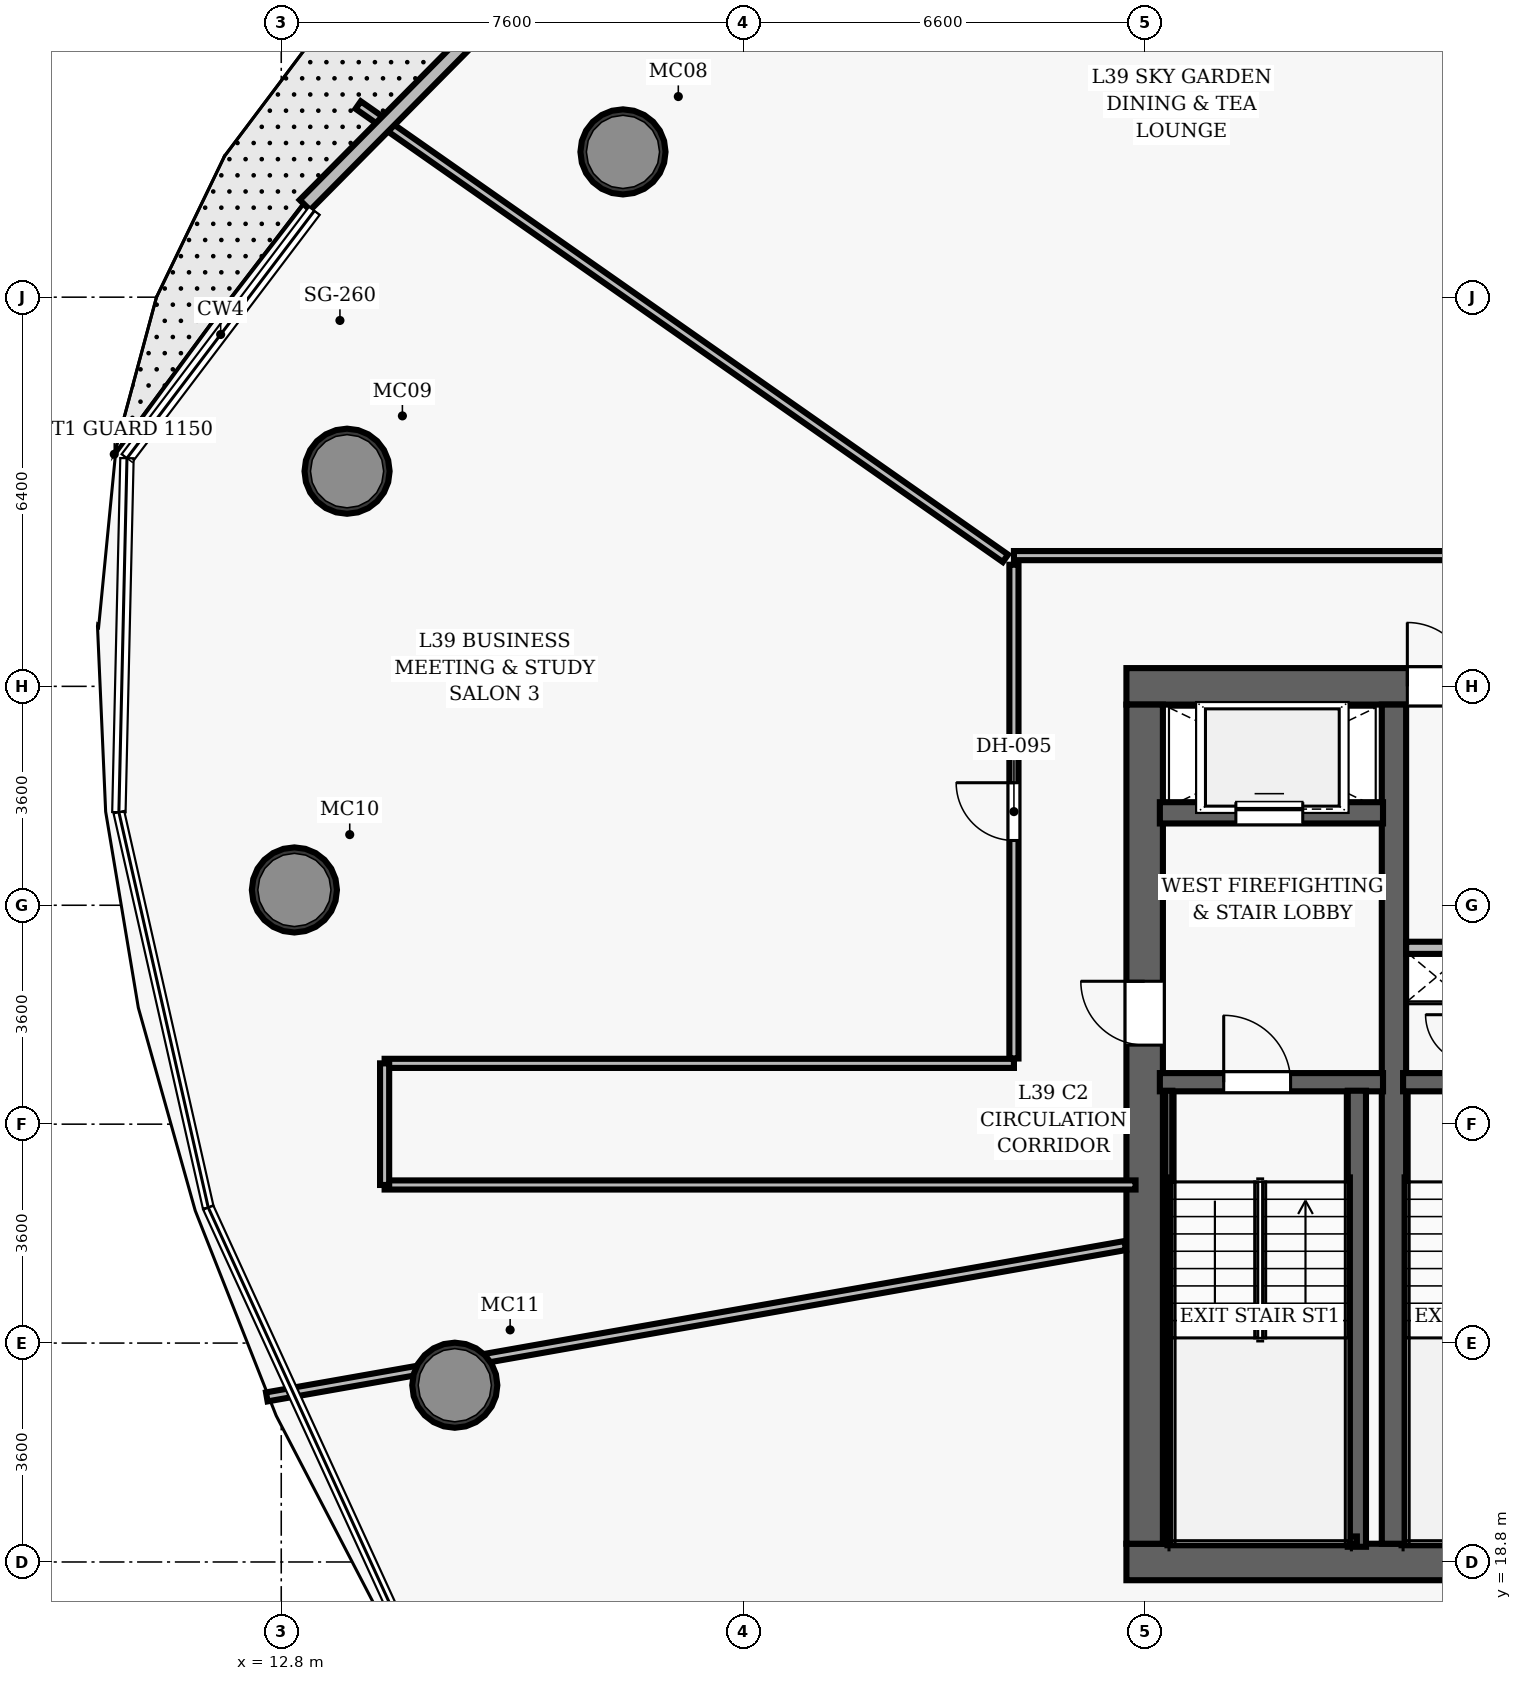
"""IFC4 building model, lengths in metres.
Left out: names, types, materials, properties, quantities, classifications, styles, units other than length and angle.
Written with IfcOpenShell. Run it as: python <this file> out.ifc"""

import sys

from ifc_helpers import new_model, si_unit, direction, frame, frame_2d, origin, origin_2d, place, context, subcontext, project, spatial, rectangle, hollow_circle, extrude, element, fill, save


model = new_model("IFC4")
c1 = context("Model", 3, precision=1e-05, world=origin(), true_north=direction((0.0, 1.0)))
c2 = subcontext(c1, "Body", "Model", "MODEL_VIEW")
j1 = project(units=[si_unit("LENGTHUNIT", "METRE"), si_unit("PLANEANGLEUNIT", "RADIAN")], contexts=[c1])
p1 = place(None, origin())
s1 = spatial("IfcSite", under=j1, at=p1, CompositionType="ELEMENT")
p2 = place(p1, origin())
s2 = spatial("IfcBuilding", under=s1, at=p2, CompositionType="ELEMENT")
p3 = place(p2, frame((0.0, 0.0, 155.3)))
s3 = spatial("IfcBuildingStorey", under=s2, at=p3, CompositionType="ELEMENT", Elevation=155.3)
p4 = place(p3, frame((26.7, 18.8, 0.0), z_axis=(0.0, 0.0, 1.0), x_axis=(1.0, 0.0, 0.0)))
e1 = element("IfcWall", 1, at=p4, inside=s3, PredefinedType="SHEAR", context=c2, shape_type="SweptSolid", body=[
    extrude(rectangle(XDim=22.6, YDim=0.6, at=frame_2d((11.3, 0.0))), origin(), (0.0, 0.0, 1.0), 3.5),
])
p5 = place(p4, frame((14.52, 0.0, 0.0)))
e2 = element("IfcOpeningElement", 2, at=p5, cuts=e1, PredefinedType="OPENING", context=c2, shape_type="SweptSolid", body=[
    extrude(rectangle(XDim=1.05, YDim=2.15, at=frame_2d((0.525, 1.075))), frame((0.0, 0.31, 0.0), z_axis=(0.0, -1.0, 0.0), x_axis=(1.0, 0.0, 0.0)), (0.0, 0.0, 1.0), 0.62),
])
p6 = place(p3, frame((26.7, 33.2, 0.0), z_axis=(0.0, 0.0, 1.0), x_axis=(1.0, 0.0, 0.0)))
e3 = element("IfcWall", 3, at=p6, inside=s3, PredefinedType="SHEAR", context=c2, shape_type="SweptSolid", body=[
    extrude(rectangle(XDim=22.6, YDim=0.6, at=frame_2d((11.3, 0.0))), origin(), (0.0, 0.0, 1.0), 3.5),
])
p7 = place(p6, frame((4.62, 0.0, 0.0)))
e4 = element("IfcOpeningElement", 4, at=p7, cuts=e3, PredefinedType="OPENING", context=c2, shape_type="SweptSolid", body=[
    extrude(rectangle(XDim=1.05, YDim=2.15, at=frame_2d((0.525, 1.075))), frame((0.0, 0.31, 0.0), z_axis=(0.0, -1.0, 0.0), x_axis=(1.0, 0.0, 0.0)), (0.0, 0.0, 1.0), 0.62),
])
p8 = place(p6, frame((14.52, 0.0, 0.0)))
e5 = element("IfcOpeningElement", 5, at=p8, cuts=e3, PredefinedType="OPENING", context=c2, shape_type="SweptSolid", body=[
    extrude(rectangle(XDim=1.05, YDim=2.15, at=frame_2d((0.525, 1.075))), frame((0.0, 0.31, 0.0), z_axis=(0.0, -1.0, 0.0), x_axis=(1.0, 0.0, 0.0)), (0.0, 0.0, 1.0), 0.62),
])
p9 = place(p3, frame((27.0, 19.1, 0.0), z_axis=(0.0, 0.0, 1.0), x_axis=(0.0, 1.0, 0.0)))
e6 = element("IfcWall", 6, at=p9, inside=s3, PredefinedType="SHEAR", context=c2, shape_type="SweptSolid", body=[
    extrude(rectangle(XDim=13.8, YDim=0.6, at=frame_2d((6.9, 0.0))), origin(), (0.0, 0.0, 1.0), 3.5),
])
p10 = place(p9, frame((8.2, 0.0, 0.0)))
e7 = element("IfcOpeningElement", 7, at=p10, cuts=e6, PredefinedType="OPENING", context=c2, shape_type="SweptSolid", body=[
    extrude(rectangle(XDim=1.05, YDim=2.15, at=frame_2d((0.525, 1.075))), frame((0.0, 0.31, 0.0), z_axis=(0.0, -1.0, 0.0), x_axis=(1.0, 0.0, 0.0)), (0.0, 0.0, 1.0), 0.62),
])
p11 = place(p3, frame((31.1, 19.1, 0.0), z_axis=(0.0, 0.0, 1.0), x_axis=(0.0, 1.0, 0.0)))
e8 = element("IfcWall", 8, at=p11, inside=s3, PredefinedType="SHEAR", context=c2, shape_type="SweptSolid", body=[
    extrude(rectangle(XDim=13.8, YDim=0.4, at=frame_2d((6.9, 0.0))), origin(), (0.0, 0.0, 1.0), 3.5),
])
for number, where, z_axis, x_axis in (
    (9, (18.42, 41.989, 0.0), (0.0, 0.0, 1.0), (1.0, 0.0, 0.0)),
    (10, (13.882, 36.738, 0.0), (0.0, 0.0, 1.0), (1.0, 0.0, 0.0)),
    (11, (13.016, 29.852, 0.0), (0.0, 0.0, 1.0), (1.0, 0.0, 0.0)),
    (12, (15.654, 21.707, 0.0), (0.0, 0.0, 1.0), (1.0, 0.0, 0.0)),
):
    element("IfcColumn", number, at=place(p3, frame(where, z_axis=z_axis, x_axis=x_axis)), inside=s3, PredefinedType="COLUMN", context=c2, shape_type="SweptSolid", body=[
        extrude(hollow_circle(Radius=0.7, WallThickness=0.055, at=origin_2d()), origin(), (0.0, 0.0, 1.0), 3.5),
    ])
p12 = place(p3, frame((27.25, 26.69, 0.0), z_axis=(0.0, 0.0, 1.0), x_axis=(1.0, 0.0, 0.0)))
e13 = element("IfcWall", 13, at=p12, inside=s3, PredefinedType="SHEAR", context=c2, shape_type="SweptSolid", body=[
    extrude(rectangle(XDim=3.67, YDim=0.3, at=frame_2d((1.835, 0.0))), origin(), (0.0, 0.0, 1.0), 3.5),
])
p13 = place(p12, frame((1.05, 0.0, 0.0)))
e14 = element("IfcOpeningElement", 14, at=p13, cuts=e13, PredefinedType="OPENING", context=c2, shape_type="SweptSolid", body=[
    extrude(rectangle(XDim=1.1, YDim=2.15, at=frame_2d((0.55, 1.075))), frame((0.0, 0.16, 0.0), z_axis=(0.0, -1.0, 0.0), x_axis=(1.0, 0.0, 0.0)), (0.0, 0.0, 1.0), 0.32),
])
p14 = place(p3, frame((30.49, 19.05, 0.0), z_axis=(0.0, 0.0, 1.0), x_axis=(0.0, 1.0, 0.0)))
e15 = element("IfcWall", 15, at=p14, inside=s3, PredefinedType="SHEAR", context=c2, shape_type="SweptSolid", body=[
    extrude(rectangle(XDim=7.5, YDim=0.3, at=frame_2d((3.75, 0.0))), origin(), (0.0, 0.0, 1.0), 3.5),
])
p15 = place(p3, frame((27.395, 19.1, 0.0), z_axis=(0.0, 0.0, 1.0), x_axis=(0.0, 1.0, 0.0)))
e16 = element("IfcWall", 16, at=p15, inside=s3, PredefinedType="SHEAR", context=c2, shape_type="SweptSolid", body=[
    extrude(rectangle(XDim=7.45, YDim=0.12, at=frame_2d((3.725, 0.0))), origin(), (0.0, 0.0, 1.0), 3.5),
])
p16 = place(p3, frame((27.395, 19.16, 0.0), z_axis=(0.0, 0.0, 1.0), x_axis=(1.0, 0.0, 0.0)))
e17 = element("IfcWall", 17, at=p16, inside=s3, PredefinedType="SHEAR", context=c2, shape_type="SweptSolid", body=[
    extrude(rectangle(XDim=3.095, YDim=0.12, at=frame_2d((1.547, 0.0))), origin(), (0.0, 0.0, 1.0), 3.5),
])
p17 = place(p3, frame((27.25, 31.12, 0.0), z_axis=(0.0, 0.0, 1.0), x_axis=(1.0, 0.0, 0.0)))
e18 = element("IfcWall", 18, at=p17, inside=s3, PredefinedType="SHEAR", context=c2, shape_type="SweptSolid", body=[
    extrude(rectangle(XDim=3.67, YDim=0.35, at=frame_2d((1.835, 0.0))), origin(), (0.0, 0.0, 1.0), 2.675),
])
p18 = place(p17, frame((1.25, 0.0, 0.0)))
e19 = element("IfcOpeningElement", 19, at=p18, cuts=e18, PredefinedType="OPENING", context=c2, shape_type="SweptSolid", body=[
    extrude(rectangle(XDim=1.1, YDim=2.15, at=frame_2d((0.55, 1.075))), frame((0.0, 0.185, 0.0), z_axis=(0.0, -1.0, 0.0), x_axis=(1.0, 0.0, 0.0)), (0.0, 0.0, 1.0), 0.37),
])
p19 = place(p3, frame((31.25, 26.69, 0.0), z_axis=(0.0, 0.0, 1.0), x_axis=(1.0, 0.0, 0.0)))
e20 = element("IfcWall", 20, at=p19, inside=s3, PredefinedType="SHEAR", context=c2, shape_type="SweptSolid", body=[
    extrude(rectangle(XDim=3.56, YDim=0.3, at=frame_2d((1.78, 0.0))), origin(), (0.0, 0.0, 1.0), 3.5),
])
p20 = place(p19, frame((1.55, 0.0, 0.0)))
e21 = element("IfcOpeningElement", 21, at=p20, cuts=e20, PredefinedType="OPENING", context=c2, shape_type="SweptSolid", body=[
    extrude(rectangle(XDim=1.1, YDim=2.15, at=frame_2d((0.55, 1.075))), frame((0.0, 0.16, 0.0), z_axis=(0.0, -1.0, 0.0), x_axis=(1.0, 0.0, 0.0)), (0.0, 0.0, 1.0), 0.32),
])
p21 = place(p3, frame((31.3, 19.16, 0.0), z_axis=(0.0, 0.0, 1.0), x_axis=(1.0, 0.0, 0.0)))
e22 = element("IfcWall", 22, at=p21, inside=s3, PredefinedType="SHEAR", context=c2, shape_type="SweptSolid", body=[
    extrude(rectangle(XDim=3.04, YDim=0.12, at=frame_2d((1.52, 0.0))), origin(), (0.0, 0.0, 1.0), 3.5),
])
p22 = place(p3, frame((31.3, 28.9, 0.0), z_axis=(0.0, 0.0, 1.0), x_axis=(1.0, 0.0, 0.0)))
e23 = element("IfcWall", 23, at=p22, inside=s3, PredefinedType="PARTITIONING", context=c2, shape_type="SweptSolid", body=[
    extrude(rectangle(XDim=1.12, YDim=0.2, at=frame_2d((0.56, 0.0))), origin(), (0.0, 0.0, 1.0), 2.675),
])
p23 = place(p3, frame((24.85, 35.35, 0.0), z_axis=(0.0, 0.0, 1.0), x_axis=(1.0, 0.0, 0.0)))
e24 = element("IfcWall", 24, at=p23, inside=s3, PredefinedType="PARTITIONING", context=c2, shape_type="SweptSolid", body=[
    extrude(rectangle(XDim=26.0, YDim=0.15, at=frame_2d((13.0, 0.0))), origin(), (0.0, 0.0, 1.0), 2.675),
])
p24 = place(p23, frame((12.935, 0.0, 0.0)))
e25 = element("IfcOpeningElement", 25, at=p24, cuts=e24, PredefinedType="OPENING", context=c2, shape_type="SweptSolid", body=[
    extrude(rectangle(XDim=0.95, YDim=2.15, at=frame_2d((0.475, 1.075))), frame((0.0, 0.085, 0.0), z_axis=(0.0, -1.0, 0.0), x_axis=(1.0, 0.0, 0.0)), (0.0, 0.0, 1.0), 0.17),
])
p25 = place(p23, frame((8.357, 0.0, 0.0)))
e26 = element("IfcOpeningElement", 26, at=p25, cuts=e24, PredefinedType="OPENING", context=c2, shape_type="SweptSolid", body=[
    extrude(rectangle(XDim=0.95, YDim=2.15, at=frame_2d((0.475, 1.075))), frame((0.0, 0.085, 0.0), z_axis=(0.0, -1.0, 0.0), x_axis=(1.0, 0.0, 0.0)), (0.0, 0.0, 1.0), 0.17),
])
p26 = place(p3, frame((24.85, 27.08, 0.0), z_axis=(0.0, 0.0, 1.0), x_axis=(0.0, 1.0, 0.0)))
e27 = element("IfcWall", 27, at=p26, inside=s3, PredefinedType="PARTITIONING", context=c2, shape_type="SweptSolid", body=[
    extrude(rectangle(XDim=8.12, YDim=0.15, at=frame_2d((4.06, 0.0))), origin(), (0.0, 0.0, 1.0), 2.675),
])
p27 = place(p26, frame((3.585, 0.0, 0.0)))
e28 = element("IfcOpeningElement", 28, at=p27, cuts=e27, PredefinedType="OPENING", context=c2, shape_type="SweptSolid", body=[
    extrude(rectangle(XDim=0.95, YDim=2.15, at=frame_2d((0.475, 1.075))), frame((0.0, 0.085, 0.0), z_axis=(0.0, -1.0, 0.0), x_axis=(1.0, 0.0, 0.0)), (0.0, 0.0, 1.0), 0.17),
])
p28 = place(p3, frame((14.5, 27.0, 0.0), z_axis=(0.0, 0.0, 1.0), x_axis=(1.0, 0.0, 0.0)))
e29 = element("IfcWall", 29, at=p28, inside=s3, PredefinedType="PARTITIONING", context=c2, shape_type="SweptSolid", body=[
    extrude(rectangle(XDim=10.35, YDim=0.15, at=frame_2d((5.175, 0.0))), origin(), (0.0, 0.0, 1.0), 2.675),
])
p29 = place(p3, frame((14.5, 25.0, 0.0), z_axis=(0.0, 0.0, 1.0), x_axis=(1.0, 0.0, 0.0)))
e30 = element("IfcWall", 30, at=p29, inside=s3, PredefinedType="PARTITIONING", context=c2, shape_type="SweptSolid", body=[
    extrude(rectangle(XDim=12.35, YDim=0.15, at=frame_2d((6.175, 0.0))), origin(), (0.0, 0.0, 1.0), 2.675),
])
p30 = place(p3, frame((14.5, 25.0, 0.0), z_axis=(0.0, 0.0, 1.0), x_axis=(0.0, 1.0, 0.0)))
e31 = element("IfcWall", 31, at=p30, inside=s3, PredefinedType="PARTITIONING", context=c2, shape_type="SweptSolid", body=[
    extrude(rectangle(XDim=2.0, YDim=0.15, at=frame_2d((1.0, 0.0))), origin(), (0.0, 0.0, 1.0), 2.675),
])
p31 = place(p3, frame((24.71, 35.306, 0.0), z_axis=(0.0, 0.0, 1.0), x_axis=(-0.819152473884, 0.573575822826, 0.0)))
e32 = element("IfcWall", 32, at=p31, inside=s3, PredefinedType="PARTITIONING", context=c2, shape_type="SweptSolid", body=[
    extrude(rectangle(XDim=12.995, YDim=0.15, at=frame_2d((6.497, 0.0))), origin(), (0.0, 0.0, 1.0), 2.675),
])
p32 = place(p3, frame((26.68, 24.004, 0.0), z_axis=(0.0, 0.0, 1.0), x_axis=(-0.984808580082, -0.173643487056, 0.0)))
e33 = element("IfcWall", 33, at=p32, inside=s3, PredefinedType="PARTITIONING", context=c2, shape_type="SweptSolid", body=[
    extrude(rectangle(XDim=14.335, YDim=0.15, at=frame_2d((7.168, 0.0))), origin(), (0.0, 0.0, 1.0), 2.675),
])
p33 = place(p3, frame((32.734, 18.48, 0.0), z_axis=(0.0, 0.0, 1.0), x_axis=(-0.573573265071, -0.819154264834, 0.0)))
e34 = element("IfcWall", 34, at=p33, inside=s3, PredefinedType="PARTITIONING", context=c2, shape_type="SweptSolid", body=[
    extrude(rectangle(XDim=13.885, YDim=0.15, at=frame_2d((6.942, 0.0))), origin(), (0.0, 0.0, 1.0), 2.675),
])
p34 = place(p3, frame((13.189, 41.115, 0.0), z_axis=(0.0, 0.0, 1.0), x_axis=(0.703641920354, 0.710554746603, 0.0)))
e35 = element("IfcWall", 35, at=p34, inside=s3, PredefinedType="SOLIDWALL", context=c2, shape_type="SweptSolid", body=[
    extrude(rectangle(XDim=10.489, YDim=0.24, at=frame_2d((5.245, 0.0))), origin(), (0.0, 0.0, 1.0), 2.45),
])
p35 = place(p34, frame((7.887, 0.0, 0.0)))
e36 = element("IfcOpeningElement", 36, at=p35, cuts=e35, PredefinedType="OPENING", context=c2, shape_type="SweptSolid", body=[
    extrude(rectangle(XDim=1.1, YDim=2.2, at=frame_2d((0.55, 1.1))), frame((0.0, 0.13, 0.0), z_axis=(0.0, -1.0, 0.0), x_axis=(1.0, 0.0, 0.0)), (0.0, 0.0, 1.0), 0.26),
])
p36 = place(p13, origin())
e37 = element("IfcDoor", 37, at=p36, inside=s3, OperationType="SINGLE_SWING_LEFT", PredefinedType="DOOR", context=c2, shape_type="SweptSolid", body=[
    extrude(rectangle(XDim=1.1, YDim=2.15, at=frame_2d((0.55, 1.075))), frame((0.0, 0.025, 0.0), z_axis=(0.0, -1.0, 0.0), x_axis=(1.0, 0.0, 0.0)), (0.0, 0.0, 1.0), 0.05),
])
fill(e14, e37)
p37 = place(p10, origin())
e38 = element("IfcDoor", 38, at=p37, inside=s3, OperationType="SINGLE_SWING_RIGHT", PredefinedType="DOOR", context=c2, shape_type="SweptSolid", body=[
    extrude(rectangle(XDim=1.05, YDim=2.15, at=frame_2d((0.525, 1.075))), frame((0.0, 0.025, 0.0), z_axis=(0.0, -1.0, 0.0), x_axis=(1.0, 0.0, 0.0)), (0.0, 0.0, 1.0), 0.05),
])
fill(e7, e38)
p38 = place(p7, origin())
e39 = element("IfcDoor", 39, at=p38, inside=s3, OperationType="SINGLE_SWING_LEFT", PredefinedType="DOOR", context=c2, shape_type="SweptSolid", body=[
    extrude(rectangle(XDim=1.05, YDim=2.15, at=frame_2d((0.525, 1.075))), frame((0.0, 0.025, 0.0), z_axis=(0.0, -1.0, 0.0), x_axis=(1.0, 0.0, 0.0)), (0.0, 0.0, 1.0), 0.05),
])
fill(e4, e39)
p39 = place(p27, origin())
e40 = element("IfcDoor", 40, at=p39, inside=s3, OperationType="SINGLE_SWING_RIGHT", PredefinedType="DOOR", context=c2, shape_type="SweptSolid", body=[
    extrude(rectangle(XDim=0.95, YDim=2.15, at=frame_2d((0.475, 1.075))), frame((0.0, 0.025, 0.0), z_axis=(0.0, -1.0, 0.0), x_axis=(1.0, 0.0, 0.0)), (0.0, 0.0, 1.0), 0.05),
])
fill(e28, e40)
p40 = place(p18, origin())
e41 = element("IfcDoor", 41, at=p40, inside=s3, OperationType="SLIDING_TO_LEFT", PredefinedType="DOOR", context=c2, shape_type="SweptSolid", body=[
    extrude(rectangle(XDim=1.1, YDim=2.15, at=frame_2d((0.55, 1.075))), frame((0.0, 0.025, 0.0), z_axis=(0.0, -1.0, 0.0), x_axis=(1.0, 0.0, 0.0)), (0.0, 0.0, 1.0), 0.05),
])
fill(e19, e41)
save(model, sys.argv[1])
